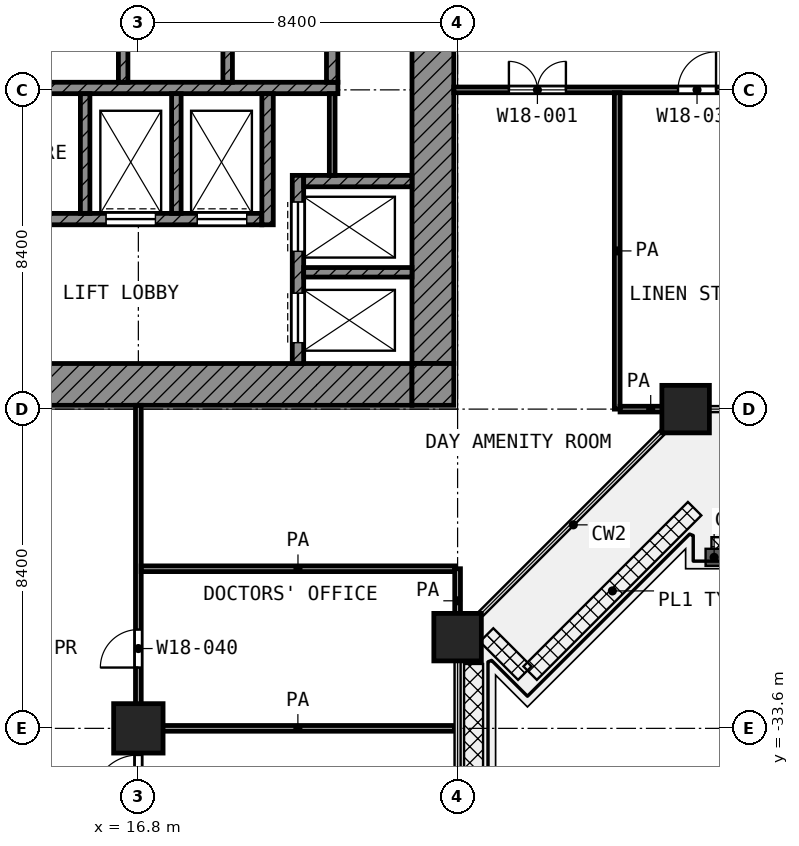
"""IFC4 building model, lengths in metres.
Left out: names, types, materials, properties, quantities, classifications, styles, units other than length and angle.
Written with IfcOpenShell. Run it as: python <this file> out.ifc"""

import sys

from ifc_helpers import new_model, si_unit, direction, frame, frame_2d, origin, origin_2d, place, context, subcontext, project, spatial, rectangle, extrude, element, fill, save


model = new_model("IFC4")
c1 = context("Model", 3, precision=1e-05, world=origin(), true_north=direction((0.0, 1.0)))
c2 = subcontext(c1, "Body", "Model", "MODEL_VIEW")
j1 = project(units=[si_unit("LENGTHUNIT", "METRE"), si_unit("PLANEANGLEUNIT", "RADIAN")], contexts=[c1])
p1 = place(None, origin())
s1 = spatial("IfcSite", under=j1, at=p1, CompositionType="ELEMENT")
p2 = place(p1, origin())
s2 = spatial("IfcBuilding", under=s1, at=p2, CompositionType="ELEMENT")
p3 = place(p2, frame((0.0, 0.0, 81.2)))
s3 = spatial("IfcBuildingStorey", under=s2, at=p3, CompositionType="ELEMENT", Elevation=81.2)
for number, where, z_axis, x_axis in (
    (1, (31.2, -25.2, 0.0), (0.0, 0.0, 1.0), (1.0, 0.0, 0.0)),
    (2, (25.2, -31.2, 0.0), (0.0, 0.0, 1.0), (1.0, 0.0, 0.0)),
):
    element("IfcColumn", number, at=place(p3, frame(where, z_axis=z_axis, x_axis=x_axis)), inside=s3, PredefinedType="COLUMN", context=c2, shape_type="SweptSolid", body=[
        extrude(rectangle(XDim=1.25, YDim=1.25, at=origin_2d()), origin(), (0.0, 0.0, 1.0), 4.2),
    ])
p4 = place(p3, frame((16.8, -33.6, 0.0), z_axis=(0.0, 0.0, 1.0), x_axis=(1.0, 0.0, 0.0)))
e3 = element("IfcColumn", 3, at=p4, inside=s3, PredefinedType="COLUMN", context=c2, shape_type="SweptSolid", body=[
    extrude(rectangle(XDim=1.3, YDim=1.3, at=origin_2d()), origin(), (0.0, 0.0, 1.0), 4.2),
])
p5 = place(p3, frame((24.55, -24.0, 0.0), z_axis=(0.0, 0.0, 1.0), x_axis=(0.0, 1.0, 0.0)))
e4 = element("IfcWall", 4, at=p5, inside=s3, PredefinedType="SHEAR", context=c2, shape_type="SweptSolid", body=[
    extrude(rectangle(XDim=18.6, YDim=1.1, at=frame_2d((9.3, 0.0))), origin(), (0.0, 0.0, 1.0), 3.9),
])
p6 = place(p5, frame((10.5, 0.0, 0.0)))
e5 = element("IfcOpeningElement", 5, at=p6, cuts=e4, PredefinedType="OPENING", context=c2, shape_type="SweptSolid", body=[
    extrude(rectangle(XDim=1.8, YDim=2.1, at=frame_2d((0.9, 1.05))), frame((0.0, 0.56, 0.0), z_axis=(0.0, -1.0, 0.0), x_axis=(1.0, 0.0, 0.0)), (0.0, 0.0, 1.0), 1.12),
])
p7 = place(p3, frame((5.4, -24.55, 0.0), z_axis=(0.0, 0.0, 1.0), x_axis=(1.0, 0.0, 0.0)))
e6 = element("IfcWall", 6, at=p7, inside=s3, PredefinedType="SHEAR", context=c2, shape_type="SweptSolid", body=[
    extrude(rectangle(XDim=18.6, YDim=1.1, at=frame_2d((9.3, 0.0))), origin(), (0.0, 0.0, 1.0), 3.9),
])
p8 = place(p7, frame((6.3, 0.0, 0.0)))
e7 = element("IfcOpeningElement", 7, at=p8, cuts=e6, PredefinedType="OPENING", context=c2, shape_type="SweptSolid", body=[
    extrude(rectangle(XDim=1.8, YDim=2.1, at=frame_2d((0.9, 1.05))), frame((0.0, 0.56, 0.0), z_axis=(0.0, -1.0, 0.0), x_axis=(1.0, 0.0, 0.0)), (0.0, 0.0, 1.0), 1.12),
])
p9 = place(p3, frame((24.55, -25.1, 0.0), z_axis=(0.0, 0.0, 1.0), x_axis=(0.0, 1.0, 0.0)))
e8 = element("IfcWall", 8, at=p9, inside=s3, PredefinedType="SHEAR", context=c2, shape_type="SweptSolid", body=[
    extrude(rectangle(XDim=1.1, YDim=1.1, at=frame_2d((0.55, 0.0))), origin(), (0.0, 0.0, 1.0), 3.9),
])
p10 = place(p3, frame((5.4, -16.75, 0.0), z_axis=(0.0, 0.0, 1.0), x_axis=(1.0, 0.0, 0.0)))
e9 = element("IfcWall", 9, at=p10, inside=s3, PredefinedType="SHEAR", context=c2, shape_type="SweptSolid", body=[
    extrude(rectangle(XDim=16.65, YDim=0.3, at=frame_2d((8.325, 0.0))), origin(), (0.0, 0.0, 1.0), 3.9),
])
p11 = place(p3, frame((5.4, -20.2, 0.0), z_axis=(0.0, 0.0, 1.0), x_axis=(1.0, 0.0, 0.0)))
e10 = element("IfcWall", 10, at=p11, inside=s3, PredefinedType="SHEAR", context=c2, shape_type="SweptSolid", body=[
    extrude(rectangle(XDim=14.65, YDim=0.3, at=frame_2d((7.325, 0.0))), origin(), (0.0, 0.0, 1.0), 3.9),
])
p12 = place(p11, frame((10.55, 0.0, 0.0)))
e11 = element("IfcOpeningElement", 11, at=p12, cuts=e10, PredefinedType="OPENING", context=c2, shape_type="SweptSolid", body=[
    extrude(rectangle(XDim=1.3, YDim=2.1, at=frame_2d((0.65, 1.05))), frame((0.0, 0.16, 0.0), z_axis=(0.0, -1.0, 0.0), x_axis=(1.0, 0.0, 0.0)), (0.0, 0.0, 1.0), 0.32),
])
p13 = place(p11, frame((12.95, 0.0, 0.0)))
e12 = element("IfcOpeningElement", 12, at=p13, cuts=e10, PredefinedType="OPENING", context=c2, shape_type="SweptSolid", body=[
    extrude(rectangle(XDim=1.3, YDim=2.1, at=frame_2d((0.65, 1.05))), frame((0.0, 0.16, 0.0), z_axis=(0.0, -1.0, 0.0), x_axis=(1.0, 0.0, 0.0)), (0.0, 0.0, 1.0), 0.32),
])
p14 = place(p11, frame((0.55, 0.0, 0.0)))
e13 = element("IfcOpeningElement", 13, at=p14, cuts=e10, PredefinedType="OPENING", context=c2, shape_type="SweptSolid", body=[
    extrude(rectangle(XDim=1.3, YDim=2.1, at=frame_2d((0.65, 1.05))), frame((0.0, 0.16, 0.0), z_axis=(0.0, -1.0, 0.0), x_axis=(1.0, 0.0, 0.0)), (0.0, 0.0, 1.0), 0.32),
])
p15 = place(p11, frame((2.95, 0.0, 0.0)))
e14 = element("IfcOpeningElement", 14, at=p15, cuts=e10, PredefinedType="OPENING", context=c2, shape_type="SweptSolid", body=[
    extrude(rectangle(XDim=1.3, YDim=2.1, at=frame_2d((0.65, 1.05))), frame((0.0, 0.16, 0.0), z_axis=(0.0, -1.0, 0.0), x_axis=(1.0, 0.0, 0.0)), (0.0, 0.0, 1.0), 0.32),
])
p16 = place(p11, frame((7.15, 0.0, 0.0)))
e15 = element("IfcOpeningElement", 15, at=p16, cuts=e10, PredefinedType="OPENING", context=c2, shape_type="SweptSolid", body=[
    extrude(rectangle(XDim=0.9, YDim=2.1, at=frame_2d((0.45, 1.05))), frame((0.0, 0.16, 0.0), z_axis=(0.0, -1.0, 0.0), x_axis=(1.0, 0.0, 0.0)), (0.0, 0.0, 1.0), 0.32),
])
p17 = place(p3, frame((20.2, -20.35, 0.0), z_axis=(0.0, 0.0, 1.0), x_axis=(0.0, 1.0, 0.0)))
e16 = element("IfcWall", 16, at=p17, inside=s3, PredefinedType="SHEAR", context=c2, shape_type="SweptSolid", body=[
    extrude(rectangle(XDim=3.45, YDim=0.3, at=frame_2d((1.725, 0.0))), origin(), (0.0, 0.0, 1.0), 3.9),
])
p18 = place(p3, frame((21.9, -16.6, 0.0), z_axis=(0.0, 0.0, 1.0), x_axis=(0.0, 1.0, 0.0)))
e17 = element("IfcWall", 17, at=p18, inside=s3, PredefinedType="SHEAR", context=c2, shape_type="SweptSolid", body=[
    extrude(rectangle(XDim=2.35, YDim=0.3, at=frame_2d((1.175, 0.0))), origin(), (0.0, 0.0, 1.0), 3.9),
])
p19 = place(p3, frame((21.15, -19.2, 0.0), z_axis=(0.0, 0.0, 1.0), x_axis=(1.0, 0.0, 0.0)))
e18 = element("IfcWall", 18, at=p19, inside=s3, PredefinedType="SHEAR", context=c2, shape_type="SweptSolid", body=[
    extrude(rectangle(XDim=2.85, YDim=0.3, at=frame_2d((1.425, 0.0))), origin(), (0.0, 0.0, 1.0), 3.9),
])
p20 = place(p3, frame((21.0, -24.0, 0.0), z_axis=(0.0, 0.0, 1.0), x_axis=(0.0, 1.0, 0.0)))
e19 = element("IfcWall", 19, at=p20, inside=s3, PredefinedType="SHEAR", context=c2, shape_type="SweptSolid", body=[
    extrude(rectangle(XDim=4.95, YDim=0.3, at=frame_2d((2.475, 0.0))), origin(), (0.0, 0.0, 1.0), 3.9),
])
p21 = place(p20, frame((2.95, 0.0, 0.0)))
e20 = element("IfcOpeningElement", 20, at=p21, cuts=e19, PredefinedType="OPENING", context=c2, shape_type="SweptSolid", body=[
    extrude(rectangle(XDim=1.3, YDim=2.1, at=frame_2d((0.65, 1.05))), frame((0.0, 0.16, 0.0), z_axis=(0.0, -1.0, 0.0), x_axis=(1.0, 0.0, 0.0)), (0.0, 0.0, 1.0), 0.32),
])
p22 = place(p20, frame((0.55, 0.0, 0.0)))
e21 = element("IfcOpeningElement", 21, at=p22, cuts=e19, PredefinedType="OPENING", context=c2, shape_type="SweptSolid", body=[
    extrude(rectangle(XDim=1.3, YDim=2.1, at=frame_2d((0.65, 1.05))), frame((0.0, 0.16, 0.0), z_axis=(0.0, -1.0, 0.0), x_axis=(1.0, 0.0, 0.0)), (0.0, 0.0, 1.0), 0.32),
])
p23 = place(p3, frame((21.15, -21.6, 0.0), z_axis=(0.0, 0.0, 1.0), x_axis=(1.0, 0.0, 0.0)))
e22 = element("IfcWall", 22, at=p23, inside=s3, PredefinedType="SHEAR", context=c2, shape_type="SweptSolid", body=[
    extrude(rectangle(XDim=2.85, YDim=0.25, at=frame_2d((1.425, 0.0))), origin(), (0.0, 0.0, 1.0), 3.9),
])
for number, where, z_axis, x_axis in (
    (23, (15.4, -20.05, 0.0), (0.0, 0.0, 1.0), (0.0, 1.0, 0.0)),
    (24, (17.8, -20.05, 0.0), (0.0, 0.0, 1.0), (0.0, 1.0, 0.0)),
):
    element("IfcWall", number, at=place(p3, frame(where, z_axis=z_axis, x_axis=x_axis)), inside=s3, PredefinedType="SHEAR", context=c2, shape_type="SweptSolid", body=[
        extrude(rectangle(XDim=3.15, YDim=0.25, at=frame_2d((1.575, 0.0))), origin(), (0.0, 0.0, 1.0), 3.9),
    ])
for number, where, z_axis, x_axis in (
    (25, (16.4, -16.6, 0.0), (0.0, 0.0, 1.0), (0.0, 1.0, 0.0)),
    (26, (19.15, -16.6, 0.0), (0.0, 0.0, 1.0), (0.0, 1.0, 0.0)),
):
    element("IfcWall", number, at=place(p3, frame(where, z_axis=z_axis, x_axis=x_axis)), inside=s3, PredefinedType="SHEAR", context=c2, shape_type="SweptSolid", body=[
        extrude(rectangle(XDim=2.35, YDim=0.25, at=frame_2d((1.175, 0.0))), origin(), (0.0, 0.0, 1.0), 3.9),
    ])
p24 = place(p3, frame((21.9, -19.05, 0.0), z_axis=(0.0, 0.0, 1.0), x_axis=(0.0, 1.0, 0.0)))
e27 = element("IfcWall", 27, at=p24, inside=s3, PredefinedType="PARTITIONING", context=c2, shape_type="SweptSolid", body=[
    extrude(rectangle(XDim=2.15, YDim=0.15, at=frame_2d((1.075, 0.0))), origin(), (0.0, 0.0, 1.0), 3.9),
])
p25 = place(p3, frame((16.875, -33.6, 0.0), z_axis=(0.0, 0.0, 1.0), x_axis=(1.0, 0.0, 0.0)))
e28 = element("IfcWall", 28, at=p25, inside=s3, PredefinedType="PARTITIONING", context=c2, shape_type="SweptSolid", body=[
    extrude(rectangle(XDim=8.245, YDim=0.15, at=frame_2d((4.123, 0.0))), origin(), (0.0, 0.0, 1.0), 3.9),
])
p26 = place(p3, frame((16.875, -29.4, 0.0), z_axis=(0.0, 0.0, 1.0), x_axis=(1.0, 0.0, 0.0)))
e29 = element("IfcWall", 29, at=p26, inside=s3, PredefinedType="PARTITIONING", context=c2, shape_type="SweptSolid", body=[
    extrude(rectangle(XDim=8.25, YDim=0.15, at=frame_2d((4.125, 0.0))), origin(), (0.0, 0.0, 1.0), 3.9),
])
p27 = place(p3, frame((29.475, -25.2, 0.0), z_axis=(0.0, 0.0, 1.0), x_axis=(1.0, 0.0, 0.0)))
e30 = element("IfcWall", 30, at=p27, inside=s3, PredefinedType="PARTITIONING", context=c2, shape_type="SweptSolid", body=[
    extrude(rectangle(XDim=1.612, YDim=0.15, at=frame_2d((0.806, 0.0))), origin(), (0.0, 0.0, 1.0), 3.9),
])
p28 = place(p3, frame((25.1, -16.8, 0.0), z_axis=(0.0, 0.0, 1.0), x_axis=(1.0, 0.0, 0.0)))
e31 = element("IfcWall", 31, at=p28, inside=s3, PredefinedType="PARTITIONING", context=c2, shape_type="SweptSolid", body=[
    extrude(rectangle(XDim=41.45, YDim=0.15, at=frame_2d((20.725, 0.0))), origin(), (0.0, 0.0, 1.0), 3.9),
])
p29 = place(p28, frame((1.45, 0.0, 0.0)))
e32 = element("IfcOpeningElement", 32, at=p29, cuts=e31, PredefinedType="OPENING", context=c2, shape_type="SweptSolid", body=[
    extrude(rectangle(XDim=1.5, YDim=2.1, at=frame_2d((0.75, 1.05))), frame((0.0, 0.085, 0.0), z_axis=(0.0, -1.0, 0.0), x_axis=(1.0, 0.0, 0.0)), (0.0, 0.0, 1.0), 0.17),
])
p30 = place(p28, frame((5.9, 0.0, 0.0)))
e33 = element("IfcOpeningElement", 33, at=p30, cuts=e31, PredefinedType="OPENING", context=c2, shape_type="SweptSolid", body=[
    extrude(rectangle(XDim=1.0, YDim=2.1, at=frame_2d((0.5, 1.05))), frame((0.0, 0.085, 0.0), z_axis=(0.0, -1.0, 0.0), x_axis=(1.0, 0.0, 0.0)), (0.0, 0.0, 1.0), 0.17),
])
p31 = place(p28, frame((10.3, 0.0, 0.0)))
e34 = element("IfcOpeningElement", 34, at=p31, cuts=e31, PredefinedType="OPENING", context=c2, shape_type="SweptSolid", body=[
    extrude(rectangle(XDim=1.2, YDim=2.1, at=frame_2d((0.6, 1.05))), frame((0.0, 0.085, 0.0), z_axis=(0.0, -1.0, 0.0), x_axis=(1.0, 0.0, 0.0)), (0.0, 0.0, 1.0), 0.17),
])
p32 = place(p28, frame((15.0, 0.0, 0.0)))
e35 = element("IfcOpeningElement", 35, at=p32, cuts=e31, PredefinedType="OPENING", context=c2, shape_type="SweptSolid", body=[
    extrude(rectangle(XDim=1.2, YDim=2.1, at=frame_2d((0.6, 1.05))), frame((0.0, 0.085, 0.0), z_axis=(0.0, -1.0, 0.0), x_axis=(1.0, 0.0, 0.0)), (0.0, 0.0, 1.0), 0.17),
])
p33 = place(p28, frame((13.55, 0.0, 0.0)))
e36 = element("IfcOpeningElement", 36, at=p33, cuts=e31, PredefinedType="OPENING", context=c2, shape_type="SweptSolid", body=[
    extrude(rectangle(XDim=1.1, YDim=2.1, at=frame_2d((0.55, 1.05))), frame((0.0, 0.085, 0.0), z_axis=(0.0, -1.0, 0.0), x_axis=(1.0, 0.0, 0.0)), (0.0, 0.0, 1.0), 0.17),
])
p34 = place(p28, frame((23.4, 0.0, 0.0)))
e37 = element("IfcOpeningElement", 37, at=p34, cuts=e31, PredefinedType="OPENING", context=c2, shape_type="SweptSolid", body=[
    extrude(rectangle(XDim=1.2, YDim=2.1, at=frame_2d((0.6, 1.05))), frame((0.0, 0.085, 0.0), z_axis=(0.0, -1.0, 0.0), x_axis=(1.0, 0.0, 0.0)), (0.0, 0.0, 1.0), 0.17),
])
p35 = place(p28, frame((26.3, 0.0, 0.0)))
e38 = element("IfcOpeningElement", 38, at=p35, cuts=e31, PredefinedType="OPENING", context=c2, shape_type="SweptSolid", body=[
    extrude(rectangle(XDim=1.2, YDim=2.1, at=frame_2d((0.6, 1.05))), frame((0.0, 0.085, 0.0), z_axis=(0.0, -1.0, 0.0), x_axis=(1.0, 0.0, 0.0)), (0.0, 0.0, 1.0), 0.17),
])
p36 = place(p28, frame((34.9, 0.0, 0.0)))
e39 = element("IfcOpeningElement", 39, at=p36, cuts=e31, PredefinedType="OPENING", context=c2, shape_type="SweptSolid", body=[
    extrude(rectangle(XDim=1.2, YDim=2.1, at=frame_2d((0.6, 1.05))), frame((0.0, 0.085, 0.0), z_axis=(0.0, -1.0, 0.0), x_axis=(1.0, 0.0, 0.0)), (0.0, 0.0, 1.0), 0.17),
])
p37 = place(p28, frame((32.1, 0.0, 0.0)))
e40 = element("IfcOpeningElement", 40, at=p37, cuts=e31, PredefinedType="OPENING", context=c2, shape_type="SweptSolid", body=[
    extrude(rectangle(XDim=0.9, YDim=2.1, at=frame_2d((0.45, 1.05))), frame((0.0, 0.085, 0.0), z_axis=(0.0, -1.0, 0.0), x_axis=(1.0, 0.0, 0.0)), (0.0, 0.0, 1.0), 0.17),
])
p38 = place(p28, frame((40.05, 0.0, 0.0)))
e41 = element("IfcOpeningElement", 41, at=p38, cuts=e31, PredefinedType="OPENING", context=c2, shape_type="SweptSolid", body=[
    extrude(rectangle(XDim=1.2, YDim=2.1, at=frame_2d((0.6, 1.05))), frame((0.0, 0.085, 0.0), z_axis=(0.0, -1.0, 0.0), x_axis=(1.0, 0.0, 0.0)), (0.0, 0.0, 1.0), 0.17),
])
p39 = place(p3, frame((16.8, -71.32, 0.0), z_axis=(0.0, 0.0, 1.0), x_axis=(0.0, 1.0, 0.0)))
e42 = element("IfcWall", 42, at=p39, inside=s3, PredefinedType="PARTITIONING", context=c2, shape_type="SweptSolid", body=[
    extrude(rectangle(XDim=46.22, YDim=0.15, at=frame_2d((23.11, 0.0))), origin(), (0.0, 0.0, 1.0), 3.9),
])
p40 = place(p39, frame((39.32, 0.0, 0.0)))
e43 = element("IfcOpeningElement", 43, at=p40, cuts=e42, PredefinedType="OPENING", context=c2, shape_type="SweptSolid", body=[
    extrude(rectangle(XDim=1.0, YDim=2.1, at=frame_2d((0.5, 1.05))), frame((0.0, 0.085, 0.0), z_axis=(0.0, -1.0, 0.0), x_axis=(1.0, 0.0, 0.0)), (0.0, 0.0, 1.0), 0.17),
])
p41 = place(p39, frame((35.82, 0.0, 0.0)))
e44 = element("IfcOpeningElement", 44, at=p41, cuts=e42, PredefinedType="OPENING", context=c2, shape_type="SweptSolid", body=[
    extrude(rectangle(XDim=1.2, YDim=2.1, at=frame_2d((0.6, 1.05))), frame((0.0, 0.085, 0.0), z_axis=(0.0, -1.0, 0.0), x_axis=(1.0, 0.0, 0.0)), (0.0, 0.0, 1.0), 0.17),
])
p42 = place(p39, frame((30.52, 0.0, 0.0)))
e45 = element("IfcOpeningElement", 45, at=p42, cuts=e42, PredefinedType="OPENING", context=c2, shape_type="SweptSolid", body=[
    extrude(rectangle(XDim=1.2, YDim=2.1, at=frame_2d((0.6, 1.05))), frame((0.0, 0.085, 0.0), z_axis=(0.0, -1.0, 0.0), x_axis=(1.0, 0.0, 0.0)), (0.0, 0.0, 1.0), 0.17),
])
p43 = place(p39, frame((27.72, 0.0, 0.0)))
e46 = element("IfcOpeningElement", 46, at=p43, cuts=e42, PredefinedType="OPENING", context=c2, shape_type="SweptSolid", body=[
    extrude(rectangle(XDim=0.9, YDim=2.1, at=frame_2d((0.45, 1.05))), frame((0.0, 0.085, 0.0), z_axis=(0.0, -1.0, 0.0), x_axis=(1.0, 0.0, 0.0)), (0.0, 0.0, 1.0), 0.17),
])
p44 = place(p39, frame((21.92, 0.0, 0.0)))
e47 = element("IfcOpeningElement", 47, at=p44, cuts=e42, PredefinedType="OPENING", context=c2, shape_type="SweptSolid", body=[
    extrude(rectangle(XDim=1.2, YDim=2.1, at=frame_2d((0.6, 1.05))), frame((0.0, 0.085, 0.0), z_axis=(0.0, -1.0, 0.0), x_axis=(1.0, 0.0, 0.0)), (0.0, 0.0, 1.0), 0.17),
])
p45 = place(p39, frame((19.02, 0.0, 0.0)))
e48 = element("IfcOpeningElement", 48, at=p45, cuts=e42, PredefinedType="OPENING", context=c2, shape_type="SweptSolid", body=[
    extrude(rectangle(XDim=1.2, YDim=2.1, at=frame_2d((0.6, 1.05))), frame((0.0, 0.085, 0.0), z_axis=(0.0, -1.0, 0.0), x_axis=(1.0, 0.0, 0.0)), (0.0, 0.0, 1.0), 0.17),
])
p46 = place(p39, frame((10.62, 0.0, 0.0)))
e49 = element("IfcOpeningElement", 49, at=p46, cuts=e42, PredefinedType="OPENING", context=c2, shape_type="SweptSolid", body=[
    extrude(rectangle(XDim=1.2, YDim=2.1, at=frame_2d((0.6, 1.05))), frame((0.0, 0.085, 0.0), z_axis=(0.0, -1.0, 0.0), x_axis=(1.0, 0.0, 0.0)), (0.0, 0.0, 1.0), 0.17),
])
p47 = place(p39, frame((9.17, 0.0, 0.0)))
e50 = element("IfcOpeningElement", 50, at=p47, cuts=e42, PredefinedType="OPENING", context=c2, shape_type="SweptSolid", body=[
    extrude(rectangle(XDim=1.1, YDim=2.1, at=frame_2d((0.55, 1.05))), frame((0.0, 0.085, 0.0), z_axis=(0.0, -1.0, 0.0), x_axis=(1.0, 0.0, 0.0)), (0.0, 0.0, 1.0), 0.17),
])
p48 = place(p39, frame((5.32, 0.0, 0.0)))
e51 = element("IfcOpeningElement", 51, at=p48, cuts=e42, PredefinedType="OPENING", context=c2, shape_type="SweptSolid", body=[
    extrude(rectangle(XDim=1.2, YDim=2.1, at=frame_2d((0.6, 1.05))), frame((0.0, 0.085, 0.0), z_axis=(0.0, -1.0, 0.0), x_axis=(1.0, 0.0, 0.0)), (0.0, 0.0, 1.0), 0.17),
])
p49 = place(p39, frame((1.52, 0.0, 0.0)))
e52 = element("IfcOpeningElement", 52, at=p49, cuts=e42, PredefinedType="OPENING", context=c2, shape_type="SweptSolid", body=[
    extrude(rectangle(XDim=1.0, YDim=2.1, at=frame_2d((0.5, 1.05))), frame((0.0, 0.085, 0.0), z_axis=(0.0, -1.0, 0.0), x_axis=(1.0, 0.0, 0.0)), (0.0, 0.0, 1.0), 0.17),
])
p50 = place(p3, frame((25.2, -31.087, 0.0), z_axis=(0.0, 0.0, 1.0), x_axis=(0.0, 1.0, 0.0)))
e53 = element("IfcWall", 53, at=p50, inside=s3, PredefinedType="PARTITIONING", context=c2, shape_type="SweptSolid", body=[
    extrude(rectangle(XDim=1.687, YDim=0.15, at=frame_2d((0.844, 0.0))), origin(), (0.0, 0.0, 1.0), 3.9),
])
p51 = place(p3, frame((29.4, -25.2, 0.0), z_axis=(0.0, 0.0, 1.0), x_axis=(0.0, 1.0, 0.0)))
e54 = element("IfcWall", 54, at=p51, inside=s3, PredefinedType="PARTITIONING", context=c2, shape_type="SweptSolid", body=[
    extrude(rectangle(XDim=8.325, YDim=0.15, at=frame_2d((4.163, 0.0))), origin(), (0.0, 0.0, 1.0), 3.9),
])
p52 = place(p21, origin())
e55 = element("IfcDoor", 55, at=p52, inside=s3, OperationType="DOUBLE_DOOR_SLIDING", PredefinedType="DOOR", context=c2, shape_type="SweptSolid", body=[
    extrude(rectangle(XDim=1.3, YDim=2.1, at=frame_2d((0.65, 1.05))), frame((0.0, 0.025, 0.0), z_axis=(0.0, -1.0, 0.0), x_axis=(1.0, 0.0, 0.0)), (0.0, 0.0, 1.0), 0.05),
])
fill(e20, e55)
p53 = place(p22, origin())
e56 = element("IfcDoor", 56, at=p53, inside=s3, OperationType="DOUBLE_DOOR_SLIDING", PredefinedType="DOOR", context=c2, shape_type="SweptSolid", body=[
    extrude(rectangle(XDim=1.3, YDim=2.1, at=frame_2d((0.65, 1.05))), frame((0.0, 0.025, 0.0), z_axis=(0.0, -1.0, 0.0), x_axis=(1.0, 0.0, 0.0)), (0.0, 0.0, 1.0), 0.05),
])
fill(e21, e56)
p54 = place(p12, origin())
e57 = element("IfcDoor", 57, at=p54, inside=s3, OperationType="DOUBLE_DOOR_SLIDING", PredefinedType="DOOR", context=c2, shape_type="SweptSolid", body=[
    extrude(rectangle(XDim=1.3, YDim=2.1, at=frame_2d((0.65, 1.05))), frame((0.0, 0.025, 0.0), z_axis=(0.0, -1.0, 0.0), x_axis=(1.0, 0.0, 0.0)), (0.0, 0.0, 1.0), 0.05),
])
fill(e11, e57)
p55 = place(p13, origin())
e58 = element("IfcDoor", 58, at=p55, inside=s3, OperationType="DOUBLE_DOOR_SLIDING", PredefinedType="DOOR", context=c2, shape_type="SweptSolid", body=[
    extrude(rectangle(XDim=1.3, YDim=2.1, at=frame_2d((0.65, 1.05))), frame((0.0, 0.025, 0.0), z_axis=(0.0, -1.0, 0.0), x_axis=(1.0, 0.0, 0.0)), (0.0, 0.0, 1.0), 0.05),
])
fill(e12, e58)
p56 = place(p29, origin())
e59 = element("IfcDoor", 59, at=p56, inside=s3, OperationType="DOUBLE_DOOR_SINGLE_SWING", PredefinedType="DOOR", context=c2, shape_type="SweptSolid", body=[
    extrude(rectangle(XDim=1.5, YDim=2.1, at=frame_2d((0.75, 1.05))), frame((0.0, 0.025, 0.0), z_axis=(0.0, -1.0, 0.0), x_axis=(1.0, 0.0, 0.0)), (0.0, 0.0, 1.0), 0.05),
])
fill(e32, e59)
p57 = place(p30, origin())
e60 = element("IfcDoor", 60, at=p57, inside=s3, OperationType="SINGLE_SWING_RIGHT", PredefinedType="DOOR", context=c2, shape_type="SweptSolid", body=[
    extrude(rectangle(XDim=1.0, YDim=2.1, at=frame_2d((0.5, 1.05))), frame((0.0, 0.025, 0.0), z_axis=(0.0, -1.0, 0.0), x_axis=(1.0, 0.0, 0.0)), (0.0, 0.0, 1.0), 0.05),
])
fill(e33, e60)
p58 = place(p40, origin())
e61 = element("IfcDoor", 61, at=p58, inside=s3, OperationType="SINGLE_SWING_LEFT", PredefinedType="DOOR", context=c2, shape_type="SweptSolid", body=[
    extrude(rectangle(XDim=1.0, YDim=2.1, at=frame_2d((0.5, 1.05))), frame((0.0, 0.025, 0.0), z_axis=(0.0, -1.0, 0.0), x_axis=(1.0, 0.0, 0.0)), (0.0, 0.0, 1.0), 0.05),
])
fill(e43, e61)
p59 = place(p41, origin())
e62 = element("IfcDoor", 62, at=p59, inside=s3, OperationType="SINGLE_SWING_LEFT", PredefinedType="DOOR", context=c2, shape_type="SweptSolid", body=[
    extrude(rectangle(XDim=1.2, YDim=2.1, at=frame_2d((0.6, 1.05))), frame((0.0, 0.025, 0.0), z_axis=(0.0, -1.0, 0.0), x_axis=(1.0, 0.0, 0.0)), (0.0, 0.0, 1.0), 0.05),
])
fill(e44, e62)
save(model, sys.argv[1])
